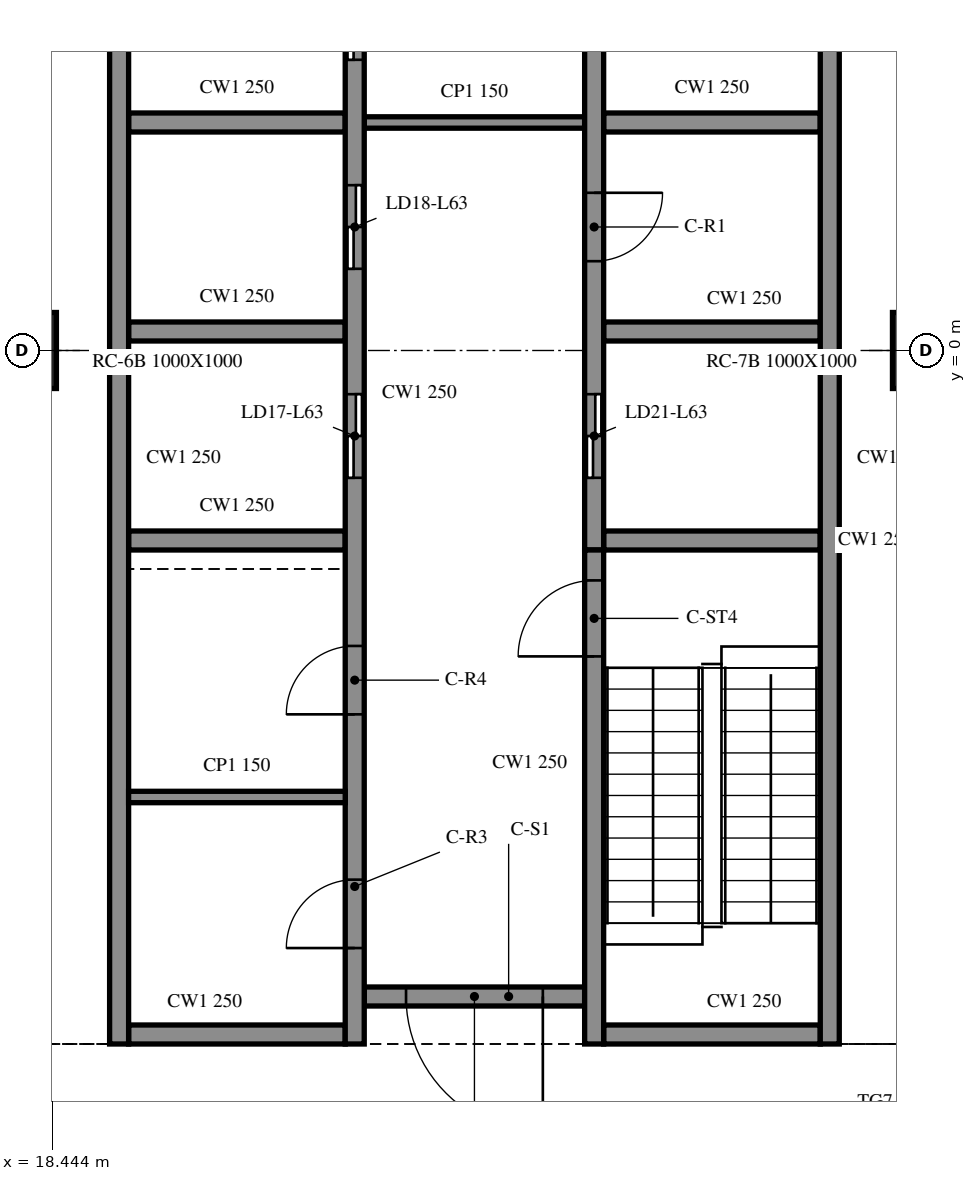
"""IFC4 building model, lengths in metres.
Left out: names, types, materials, properties, quantities, classifications, styles, units other than length and angle.
Written with IfcOpenShell. Run it as: python <this file> out.ifc"""

import sys

from ifc_helpers import new_model, si_unit, direction, frame, frame_2d, origin, origin_2d, place, context, subcontext, project, spatial, rectangle, extrude, element, fill, save


model = new_model("IFC4")
c1 = context("Model", 3, precision=1e-05, world=origin(), true_north=direction((0.0, 1.0)))
c2 = subcontext(c1, "Body", "Model", "MODEL_VIEW")
j1 = project(units=[si_unit("LENGTHUNIT", "METRE"), si_unit("PLANEANGLEUNIT", "RADIAN")], contexts=[c1])
p1 = place(None, origin())
s1 = spatial("IfcSite", under=j1, at=p1, CompositionType="ELEMENT")
p2 = place(p1, origin())
s2 = spatial("IfcBuilding", under=s1, at=p2, CompositionType="ELEMENT")
p3 = place(p2, frame((0.0, 0.0, 259.0)))
s3 = spatial("IfcBuildingStorey", under=s2, at=p3, CompositionType="ELEMENT", Elevation=259.0)
for number, where, z_axis, x_axis in (
    (1, (18.0, 0.0, -0.4), (0.0, 0.0, 1.0), (1.0, 0.0, 0.0)),
    (2, (30.0, 0.0, -0.4), (0.0, 0.0, 1.0), (1.0, 0.0, 0.0)),
):
    element("IfcColumn", number, at=place(p3, frame(where, z_axis=z_axis, x_axis=x_axis)), inside=s3, PredefinedType="COLUMN", context=c2, shape_type="SweptSolid", body=[
        extrude(rectangle(XDim=1.0, YDim=1.0, at=origin_2d()), origin(), (0.0, 0.0, 1.0), 4.36),
    ])
p4 = place(p3, frame((19.325, 15.125, 0.0), z_axis=(0.0, 0.0, 1.0), x_axis=(0.0, -1.0, 0.0)))
e3 = element("IfcWall", 3, at=p4, inside=s3, PredefinedType="SOLIDWALL", context=c2, shape_type="SweptSolid", body=[
    extrude(rectangle(XDim=24.25, YDim=0.25, at=frame_2d((12.125, 0.0))), origin(), (0.0, 0.0, 1.0), 3.96),
])
p5 = place(p3, frame((28.675, -9.125, 0.0), z_axis=(0.0, 0.0, 1.0), x_axis=(0.0, 1.0, 0.0)))
e4 = element("IfcWall", 4, at=p5, inside=s3, PredefinedType="SOLIDWALL", context=c2, shape_type="SweptSolid", body=[
    extrude(rectangle(XDim=24.25, YDim=0.25, at=frame_2d((12.125, 0.0))), origin(), (0.0, 0.0, 1.0), 3.96),
])
p6 = place(p5, frame((14.425, 0.0, 0.0)))
e5 = element("IfcOpeningElement", 5, at=p6, cuts=e4, PredefinedType="OPENING", context=c2, shape_type="SweptSolid", body=[
    extrude(rectangle(XDim=0.9, YDim=2.1, at=frame_2d((0.45, 1.05))), frame((0.0, 0.135, 0.0), z_axis=(0.0, -1.0, 0.0), x_axis=(1.0, 0.0, 0.0)), (0.0, 0.0, 1.0), 0.27),
])
p7 = place(p5, frame((19.225, 0.0, 0.0)))
e6 = element("IfcOpeningElement", 6, at=p7, cuts=e4, PredefinedType="OPENING", context=c2, shape_type="SweptSolid", body=[
    extrude(rectangle(XDim=0.9, YDim=2.1, at=frame_2d((0.45, 1.05))), frame((0.0, 0.135, 0.0), z_axis=(0.0, -1.0, 0.0), x_axis=(1.0, 0.0, 0.0)), (0.0, 0.0, 1.0), 0.27),
])
for number, where, z_axis, x_axis in (
    (7, (22.3, -9.0, 0.0), (0.0, 0.0, 1.0), (-1.0, 0.0, 0.0)),
    (8, (28.55, -9.0, 0.0), (0.0, 0.0, 1.0), (-1.0, 0.0, 0.0)),
):
    element("IfcWall", number, at=place(p3, frame(where, z_axis=z_axis, x_axis=x_axis)), inside=s3, PredefinedType="SOLIDWALL", context=c2, shape_type="SweptSolid", body=[
        extrude(rectangle(XDim=2.85, YDim=0.25, at=frame_2d((1.425, 0.0))), origin(), (0.0, 0.0, 1.0), 3.96),
    ])
p8 = place(p3, frame((25.45, -8.5, 0.0), z_axis=(0.0, 0.0, 1.0), x_axis=(-1.0, 0.0, 0.0)))
e9 = element("IfcWall", 9, at=p8, inside=s3, PredefinedType="SOLIDWALL", context=c2, shape_type="SweptSolid", body=[
    extrude(rectangle(XDim=2.9, YDim=0.25, at=frame_2d((1.45, 0.0))), origin(), (0.0, 0.0, 1.0), 3.96),
])
p9 = place(p8, frame((0.55, 0.0, 0.0)))
e10 = element("IfcOpeningElement", 10, at=p9, cuts=e9, PredefinedType="OPENING", context=c2, shape_type="SweptSolid", body=[
    extrude(rectangle(XDim=1.8, YDim=2.1, at=frame_2d((0.9, 1.05))), frame((0.0, 0.135, 0.0), z_axis=(0.0, -1.0, 0.0), x_axis=(1.0, 0.0, 0.0)), (0.0, 0.0, 1.0), 0.27),
])
p10 = place(p3, frame((22.425, -9.125, 0.0), z_axis=(0.0, 0.0, 1.0), x_axis=(0.0, 1.0, 0.0)))
e11 = element("IfcWall", 11, at=p10, inside=s3, PredefinedType="SOLIDWALL", context=c2, shape_type="SweptSolid", body=[
    extrude(rectangle(XDim=17.75, YDim=0.25, at=frame_2d((8.875, 0.0))), origin(), (0.0, 0.0, 1.0), 3.96),
])
p11 = place(p10, frame((7.45, 0.0, 0.0)))
e12 = element("IfcOpeningElement", 12, at=p11, cuts=e11, PredefinedType="OPENING", context=c2, shape_type="SweptSolid", body=[
    extrude(rectangle(XDim=1.1, YDim=2.1, at=frame_2d((0.55, 1.05))), frame((0.0, 0.135, 0.0), z_axis=(0.0, -1.0, 0.0), x_axis=(1.0, 0.0, 0.0)), (0.0, 0.0, 1.0), 0.27),
])
p12 = place(p10, frame((10.2, 0.0, 0.0)))
e13 = element("IfcOpeningElement", 13, at=p12, cuts=e11, PredefinedType="OPENING", context=c2, shape_type="SweptSolid", body=[
    extrude(rectangle(XDim=1.1, YDim=2.1, at=frame_2d((0.55, 1.05))), frame((0.0, 0.135, 0.0), z_axis=(0.0, -1.0, 0.0), x_axis=(1.0, 0.0, 0.0)), (0.0, 0.0, 1.0), 0.27),
])
p13 = place(p10, frame((12.95, 0.0, 0.0)))
e14 = element("IfcOpeningElement", 14, at=p13, cuts=e11, PredefinedType="OPENING", context=c2, shape_type="SweptSolid", body=[
    extrude(rectangle(XDim=1.1, YDim=2.1, at=frame_2d((0.55, 1.05))), frame((0.0, 0.135, 0.0), z_axis=(0.0, -1.0, 0.0), x_axis=(1.0, 0.0, 0.0)), (0.0, 0.0, 1.0), 0.27),
])
p14 = place(p10, frame((15.7, 0.0, 0.0)))
e15 = element("IfcOpeningElement", 15, at=p14, cuts=e11, PredefinedType="OPENING", context=c2, shape_type="SweptSolid", body=[
    extrude(rectangle(XDim=1.1, YDim=2.1, at=frame_2d((0.55, 1.05))), frame((0.0, 0.135, 0.0), z_axis=(0.0, -1.0, 0.0), x_axis=(1.0, 0.0, 0.0)), (0.0, 0.0, 1.0), 0.27),
])
p15 = place(p10, frame((1.262, 0.0, 0.0)))
e16 = element("IfcOpeningElement", 16, at=p15, cuts=e11, PredefinedType="OPENING", context=c2, shape_type="SweptSolid", body=[
    extrude(rectangle(XDim=0.9, YDim=2.1, at=frame_2d((0.45, 1.05))), frame((0.0, 0.135, 0.0), z_axis=(0.0, -1.0, 0.0), x_axis=(1.0, 0.0, 0.0)), (0.0, 0.0, 1.0), 0.27),
])
p16 = place(p10, frame((4.337, 0.0, 0.0)))
e17 = element("IfcOpeningElement", 17, at=p16, cuts=e11, PredefinedType="OPENING", context=c2, shape_type="SweptSolid", body=[
    extrude(rectangle(XDim=0.9, YDim=2.1, at=frame_2d((0.45, 1.05))), frame((0.0, 0.135, 0.0), z_axis=(0.0, -1.0, 0.0), x_axis=(1.0, 0.0, 0.0)), (0.0, 0.0, 1.0), 0.27),
])
p17 = place(p3, frame((25.575, -9.125, 0.0), z_axis=(0.0, 0.0, 1.0), x_axis=(0.0, 1.0, 0.0)))
e18 = element("IfcWall", 18, at=p17, inside=s3, PredefinedType="SOLIDWALL", context=c2, shape_type="SweptSolid", body=[
    extrude(rectangle(XDim=6.5, YDim=0.25, at=frame_2d((3.25, 0.0))), origin(), (0.0, 0.0, 1.0), 3.96),
])
p18 = place(p17, frame((5.1, 0.0, 0.0)))
e19 = element("IfcOpeningElement", 19, at=p18, cuts=e18, PredefinedType="OPENING", context=c2, shape_type="SweptSolid", body=[
    extrude(rectangle(XDim=1.0, YDim=2.1, at=frame_2d((0.5, 1.05))), frame((0.0, 0.135, 0.0), z_axis=(0.0, -1.0, 0.0), x_axis=(1.0, 0.0, 0.0)), (0.0, 0.0, 1.0), 0.27),
])
p19 = place(p3, frame((25.575, 14.875, 0.0), z_axis=(0.0, 0.0, 1.0), x_axis=(0.0, -1.0, 0.0)))
e20 = element("IfcWall", 20, at=p19, inside=s3, PredefinedType="SOLIDWALL", context=c2, shape_type="SweptSolid", body=[
    extrude(rectangle(XDim=17.5, YDim=0.25, at=frame_2d((8.75, 0.0))), origin(), (0.0, 0.0, 1.0), 3.96),
])
p20 = place(p19, frame((15.45, 0.0, 0.0)))
e21 = element("IfcOpeningElement", 21, at=p20, cuts=e20, PredefinedType="OPENING", context=c2, shape_type="SweptSolid", body=[
    extrude(rectangle(XDim=1.1, YDim=2.1, at=frame_2d((0.55, 1.05))), frame((0.0, 0.135, 0.0), z_axis=(0.0, -1.0, 0.0), x_axis=(1.0, 0.0, 0.0)), (0.0, 0.0, 1.0), 0.27),
])
p21 = place(p19, frame((12.8, 0.0, 0.0)))
e22 = element("IfcOpeningElement", 22, at=p21, cuts=e20, PredefinedType="OPENING", context=c2, shape_type="SweptSolid", body=[
    extrude(rectangle(XDim=0.9, YDim=2.1, at=frame_2d((0.45, 1.05))), frame((0.0, 0.135, 0.0), z_axis=(0.0, -1.0, 0.0), x_axis=(1.0, 0.0, 0.0)), (0.0, 0.0, 1.0), 0.27),
])
for number, where, z_axis, x_axis in (
    (23, (19.45, -2.5, 0.0), (0.0, 0.0, 1.0), (1.0, 0.0, 0.0)),
    (24, (19.45, 0.25, 0.0), (0.0, 0.0, 1.0), (1.0, 0.0, 0.0)),
    (25, (19.45, 3.0, 0.0), (0.0, 0.0, 1.0), (1.0, 0.0, 0.0)),
    (26, (25.7, -2.5, 0.0), (0.0, 0.0, 1.0), (1.0, 0.0, 0.0)),
    (27, (25.7, 0.25, 0.0), (0.0, 0.0, 1.0), (1.0, 0.0, 0.0)),
    (28, (25.7, 3.0, 0.0), (0.0, 0.0, 1.0), (1.0, 0.0, 0.0)),
):
    element("IfcWall", number, at=place(p3, frame(where, z_axis=z_axis, x_axis=x_axis)), inside=s3, PredefinedType="SOLIDWALL", context=c2, shape_type="SweptSolid", body=[
        extrude(rectangle(XDim=2.85, YDim=0.25, at=frame_2d((1.425, 0.0))), origin(), (0.0, 0.0, 1.0), 3.96),
    ])
p22 = place(p3, frame((22.55, 3.0, 0.0), z_axis=(0.0, 0.0, 1.0), x_axis=(1.0, 0.0, 0.0)))
e29 = element("IfcWall", 29, at=p22, inside=s3, PredefinedType="PARTITIONING", context=c2, shape_type="SweptSolid", body=[
    extrude(rectangle(XDim=2.9, YDim=0.15, at=frame_2d((1.45, 0.0))), origin(), (0.0, 0.0, 1.0), 3.96),
])
p23 = place(p3, frame((19.45, -5.875, 0.0), z_axis=(0.0, 0.0, 1.0), x_axis=(1.0, 0.0, 0.0)))
e30 = element("IfcWall", 30, at=p23, inside=s3, PredefinedType="PARTITIONING", context=c2, shape_type="SweptSolid", body=[
    extrude(rectangle(XDim=2.85, YDim=0.15, at=frame_2d((1.425, 0.0))), origin(), (0.0, 0.0, 1.0), 3.96),
])
p24 = place(p9, origin())
e31 = element("IfcDoor", 31, at=p24, inside=s3, OperationType="DOUBLE_DOOR_SINGLE_SWING", PredefinedType="DOOR", context=c2, shape_type="SweptSolid", body=[
    extrude(rectangle(XDim=1.8, YDim=2.1, at=frame_2d((0.9, 1.05))), frame((0.0, 0.025, 0.0), z_axis=(0.0, -1.0, 0.0), x_axis=(1.0, 0.0, 0.0)), (0.0, 0.0, 1.0), 0.05),
])
fill(e10, e31)
p25 = place(p20, origin())
e32 = element("IfcDoor", 32, at=p25, inside=s3, OperationType="DOUBLE_DOOR_SLIDING", PredefinedType="DOOR", context=c2, shape_type="SweptSolid", body=[
    extrude(rectangle(XDim=1.1, YDim=2.1, at=frame_2d((0.55, 1.05))), frame((0.0, 0.025, 0.0), z_axis=(0.0, -1.0, 0.0), x_axis=(1.0, 0.0, 0.0)), (0.0, 0.0, 1.0), 0.05),
])
fill(e21, e32)
p26 = place(p11, origin())
e33 = element("IfcDoor", 33, at=p26, inside=s3, OperationType="DOUBLE_DOOR_SLIDING", PredefinedType="DOOR", context=c2, shape_type="SweptSolid", body=[
    extrude(rectangle(XDim=1.1, YDim=2.1, at=frame_2d((0.55, 1.05))), frame((0.0, 0.025, 0.0), z_axis=(0.0, -1.0, 0.0), x_axis=(1.0, 0.0, 0.0)), (0.0, 0.0, 1.0), 0.05),
])
fill(e12, e33)
p27 = place(p12, origin())
e34 = element("IfcDoor", 34, at=p27, inside=s3, OperationType="DOUBLE_DOOR_SLIDING", PredefinedType="DOOR", context=c2, shape_type="SweptSolid", body=[
    extrude(rectangle(XDim=1.1, YDim=2.1, at=frame_2d((0.55, 1.05))), frame((0.0, 0.025, 0.0), z_axis=(0.0, -1.0, 0.0), x_axis=(1.0, 0.0, 0.0)), (0.0, 0.0, 1.0), 0.05),
])
fill(e13, e34)
p28 = place(p13, origin())
e35 = element("IfcDoor", 35, at=p28, inside=s3, OperationType="DOUBLE_DOOR_SLIDING", PredefinedType="DOOR", context=c2, shape_type="SweptSolid", body=[
    extrude(rectangle(XDim=1.1, YDim=2.1, at=frame_2d((0.55, 1.05))), frame((0.0, 0.025, 0.0), z_axis=(0.0, -1.0, 0.0), x_axis=(1.0, 0.0, 0.0)), (0.0, 0.0, 1.0), 0.05),
])
fill(e14, e35)
p29 = place(p21, origin())
e36 = element("IfcDoor", 36, at=p29, inside=s3, OperationType="SINGLE_SWING_LEFT", PredefinedType="DOOR", context=c2, shape_type="SweptSolid", body=[
    extrude(rectangle(XDim=0.9, YDim=2.1, at=frame_2d((0.45, 1.05))), frame((0.0, 0.025, 0.0), z_axis=(0.0, -1.0, 0.0), x_axis=(1.0, 0.0, 0.0)), (0.0, 0.0, 1.0), 0.05),
])
fill(e22, e36)
p30 = place(p15, origin())
e37 = element("IfcDoor", 37, at=p30, inside=s3, OperationType="SINGLE_SWING_LEFT", PredefinedType="DOOR", context=c2, shape_type="SweptSolid", body=[
    extrude(rectangle(XDim=0.9, YDim=2.1, at=frame_2d((0.45, 1.05))), frame((0.0, 0.025, 0.0), z_axis=(0.0, -1.0, 0.0), x_axis=(1.0, 0.0, 0.0)), (0.0, 0.0, 1.0), 0.05),
])
fill(e16, e37)
p31 = place(p16, origin())
e38 = element("IfcDoor", 38, at=p31, inside=s3, OperationType="SINGLE_SWING_RIGHT", PredefinedType="DOOR", context=c2, shape_type="SweptSolid", body=[
    extrude(rectangle(XDim=0.9, YDim=2.1, at=frame_2d((0.45, 1.05))), frame((0.0, 0.025, 0.0), z_axis=(0.0, -1.0, 0.0), x_axis=(1.0, 0.0, 0.0)), (0.0, 0.0, 1.0), 0.05),
])
fill(e17, e38)
p32 = place(p18, origin())
e39 = element("IfcDoor", 39, at=p32, inside=s3, OperationType="SINGLE_SWING_LEFT", PredefinedType="DOOR", context=c2, shape_type="SweptSolid", body=[
    extrude(rectangle(XDim=1.0, YDim=2.1, at=frame_2d((0.5, 1.05))), frame((0.0, 0.025, 0.0), z_axis=(0.0, -1.0, 0.0), x_axis=(1.0, 0.0, 0.0)), (0.0, 0.0, 1.0), 0.05),
])
fill(e19, e39)
save(model, sys.argv[1])
